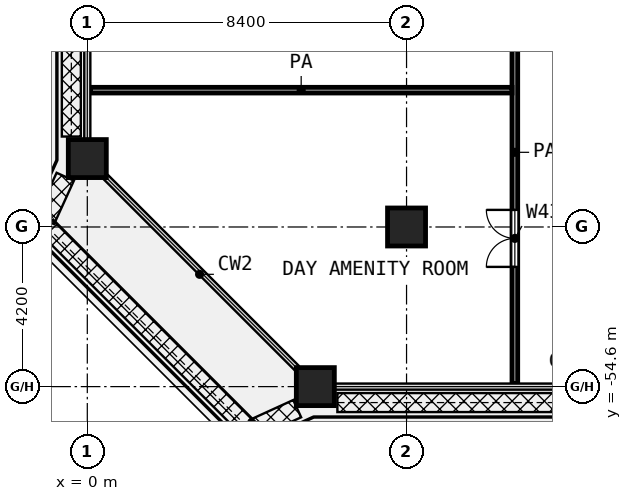
"""IFC4 building model, lengths in metres.
Left out: names, types, materials, properties, quantities, classifications, styles, units other than length and angle.
Written with IfcOpenShell. Run it as: python <this file> out.ifc"""

import sys

from ifc_helpers import new_model, si_unit, direction, frame, frame_2d, origin, origin_2d, place, context, subcontext, project, spatial, rectangle, extrude, element, fill, save


model = new_model("IFC4")
c1 = context("Model", 3, precision=1e-05, world=origin(), true_north=direction((0.0, 1.0)))
c2 = subcontext(c1, "Body", "Model", "MODEL_VIEW")
j1 = project(units=[si_unit("LENGTHUNIT", "METRE"), si_unit("PLANEANGLEUNIT", "RADIAN")], contexts=[c1])
p1 = place(None, origin())
s1 = spatial("IfcSite", under=j1, at=p1, CompositionType="ELEMENT")
p2 = place(p1, origin())
s2 = spatial("IfcBuilding", under=s1, at=p2, CompositionType="ELEMENT")
p3 = place(p2, frame((0.0, 0.0, 208.8)))
s3 = spatial("IfcBuildingStorey", under=s2, at=p3, CompositionType="ELEMENT", Elevation=208.8)
for number, where, z_axis, x_axis in (
    (1, (0.0, -48.6, 0.0), (0.0, 0.0, 1.0), (1.0, 0.0, 0.0)),
    (2, (8.4, -50.4, 0.0), (0.0, 0.0, 1.0), (1.0, 0.0, 0.0)),
    (3, (6.0, -54.6, 0.0), (0.0, 0.0, 1.0), (1.0, 0.0, 0.0)),
):
    element("IfcColumn", number, at=place(p3, frame(where, z_axis=z_axis, x_axis=x_axis)), inside=s3, PredefinedType="COLUMN", context=c2, shape_type="SweptSolid", body=[
        extrude(rectangle(XDim=1.0, YDim=1.0, at=origin_2d()), origin(), (0.0, 0.0, 1.0), 4.2),
    ])
p4 = place(p3, frame((0.08, -46.8, 0.0), z_axis=(0.0, 0.0, 1.0), x_axis=(1.0, 0.0, 0.0)))
e4 = element("IfcWall", 4, at=p4, inside=s3, PredefinedType="PARTITIONING", context=c2, shape_type="SweptSolid", body=[
    extrude(rectangle(XDim=11.095, YDim=0.15, at=frame_2d((5.547, 0.0))), origin(), (0.0, 0.0, 1.0), 3.7),
])
p5 = place(p3, frame((11.25, -54.52, 0.0), z_axis=(0.0, 0.0, 1.0), x_axis=(0.0, 1.0, 0.0)))
e5 = element("IfcWall", 5, at=p5, inside=s3, PredefinedType="PARTITIONING", context=c2, shape_type="SweptSolid", body=[
    extrude(rectangle(XDim=12.17, YDim=0.15, at=frame_2d((6.085, 0.0))), origin(), (0.0, 0.0, 1.0), 3.7),
])
p6 = place(p5, frame((3.07, 0.0, 0.0)))
e6 = element("IfcOpeningElement", 6, at=p6, cuts=e5, PredefinedType="OPENING", context=c2, shape_type="SweptSolid", body=[
    extrude(rectangle(XDim=1.5, YDim=2.1, at=frame_2d((0.75, 1.05))), frame((0.0, 0.085, 0.0), z_axis=(0.0, -1.0, 0.0), x_axis=(1.0, 0.0, 0.0)), (0.0, 0.0, 1.0), 0.17),
])
p7 = place(p6, origin())
e7 = element("IfcDoor", 7, at=p7, inside=s3, OperationType="DOUBLE_DOOR_SINGLE_SWING", PredefinedType="DOOR", context=c2, shape_type="SweptSolid", body=[
    extrude(rectangle(XDim=1.5, YDim=2.1, at=frame_2d((0.75, 1.05))), frame((0.0, 0.025, 0.0), z_axis=(0.0, -1.0, 0.0), x_axis=(1.0, 0.0, 0.0)), (0.0, 0.0, 1.0), 0.05),
])
fill(e6, e7)
save(model, sys.argv[1])
